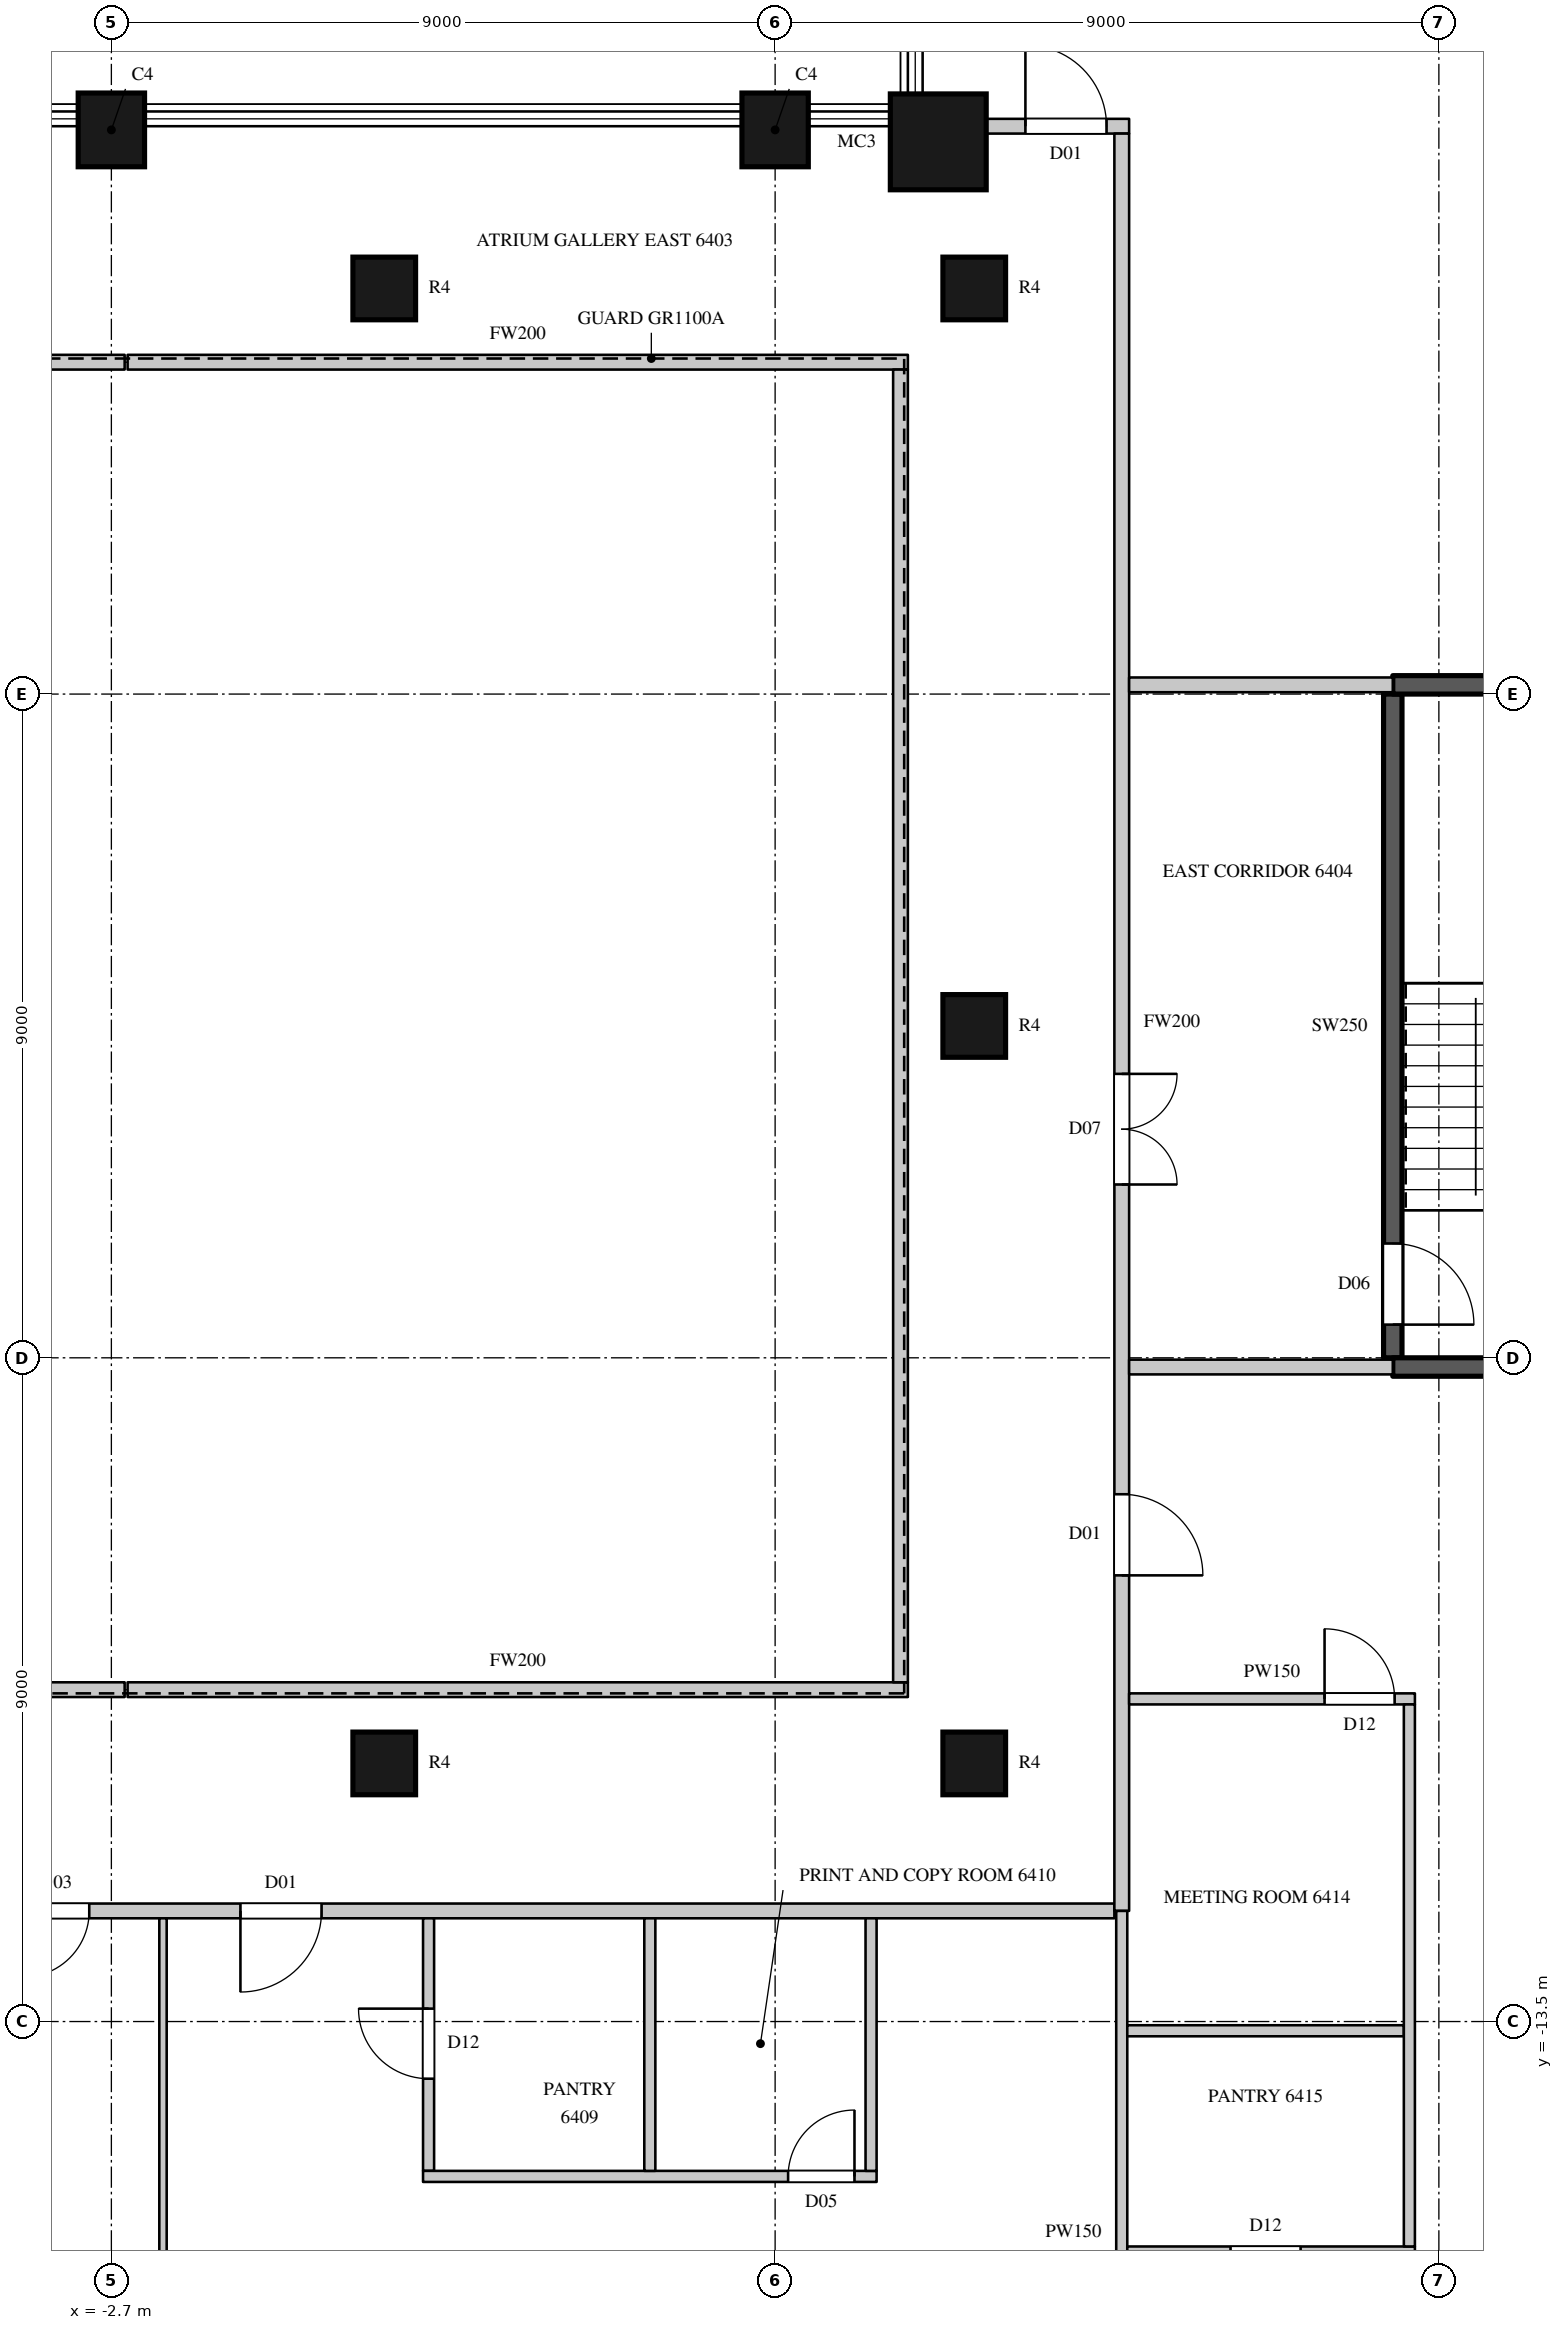
"""IFC4 building model, lengths in metres.
Left out: names, types, materials, properties, quantities, classifications, styles, units other than length and angle.
Written with IfcOpenShell. Run it as: python <this file> out.ifc"""

import sys

from ifc_helpers import new_model, si_unit, direction, frame, frame_2d, origin, origin_2d, place, context, subcontext, project, spatial, rectangle, circle, extrude, element, fill, save


model = new_model("IFC4")
c1 = context("Model", 3, precision=1e-05, world=origin(), true_north=direction((0.0, 1.0)))
c2 = subcontext(c1, "Body", "Model", "MODEL_VIEW")
j1 = project(units=[si_unit("LENGTHUNIT", "METRE"), si_unit("PLANEANGLEUNIT", "RADIAN")], contexts=[c1])
p1 = place(None, origin())
s1 = spatial("IfcSite", under=j1, at=p1, CompositionType="ELEMENT")
p2 = place(p1, origin())
s2 = spatial("IfcBuilding", under=s1, at=p2, CompositionType="ELEMENT")
p3 = place(p2, frame((0.0, 0.0, 284.4)))
s3 = spatial("IfcBuildingStorey", under=s2, at=p3, CompositionType="ELEMENT", Elevation=284.4)
p4 = place(p3, frame((8.512, 11.988, 0.0), z_axis=(0.0, 0.0, 1.0), x_axis=(1.0, 0.0, 0.0)))
e1 = element("IfcColumn", 1, at=p4, inside=s3, PredefinedType="COLUMN", context=c2, shape_type="SweptSolid", body=[
    extrude(circle(Radius=0.65, at=origin_2d()), origin(), (0.0, 0.0, 1.0), 4.1),
])
for number, where, z_axis, x_axis in (
    (2, (6.3, 12.15, 0.0), (0.0, 0.0, 1.0), (-1.0, 0.0, 0.0)),
    (3, (-2.7, 12.15, 0.0), (0.0, 0.0, 1.0), (-1.0, 0.0, 0.0)),
):
    element("IfcColumn", number, at=place(p3, frame(where, z_axis=z_axis, x_axis=x_axis)), inside=s3, PredefinedType="COLUMN", context=c2, shape_type="SweptSolid", body=[
        extrude(rectangle(XDim=0.9, YDim=1.0, at=origin_2d()), origin(), (0.0, 0.0, 1.0), 4.1),
    ])
for number, where, z_axis, x_axis in (
    (4, (1.0, -10.0, 0.0), (0.0, 0.0, 1.0), (1.0, 0.0, 0.0)),
    (5, (1.0, 10.0, 0.0), (0.0, 0.0, 1.0), (1.0, 0.0, 0.0)),
    (6, (9.0, -10.0, 0.0), (0.0, 0.0, 1.0), (1.0, 0.0, 0.0)),
    (7, (9.0, 0.0, 0.0), (0.0, 0.0, 1.0), (1.0, 0.0, 0.0)),
    (8, (9.0, 10.0, 0.0), (0.0, 0.0, 1.0), (1.0, 0.0, 0.0)),
):
    element("IfcColumn", number, at=place(p3, frame(where, z_axis=z_axis, x_axis=x_axis)), inside=s3, PredefinedType="COLUMN", context=c2, shape_type="SweptSolid", body=[
        extrude(circle(Radius=0.425, at=origin_2d()), origin(), (0.0, 0.0, 1.0), 4.1),
    ])
p5 = place(p3, frame((-10.9, -12.0, 0.0), z_axis=(0.0, 0.0, 1.0), x_axis=(1.0, 0.0, 0.0)))
e9 = element("IfcWall", 9, at=p5, inside=s3, PredefinedType="PARTITIONING", context=c2, shape_type="SweptSolid", body=[
    extrude(rectangle(XDim=21.8, YDim=0.2, at=frame_2d((10.9, 0.0))), origin(), (0.0, 0.0, 1.0), 3.8),
])
p6 = place(p5, frame((1.1, 0.0, 0.0)))
e10 = element("IfcOpeningElement", 10, at=p6, cuts=e9, PredefinedType="OPENING", context=c2, shape_type="SweptSolid", body=[
    extrude(rectangle(XDim=0.9, YDim=2.2, at=frame_2d((0.45, 1.1))), frame((0.0, 0.11, 0.0), z_axis=(0.0, -1.0, 0.0), x_axis=(1.0, 0.0, 0.0)), (0.0, 0.0, 1.0), 0.22),
])
p7 = place(p5, frame((4.9, 0.0, 0.0)))
e11 = element("IfcOpeningElement", 11, at=p7, cuts=e9, PredefinedType="OPENING", context=c2, shape_type="SweptSolid", body=[
    extrude(rectangle(XDim=0.9, YDim=2.2, at=frame_2d((0.45, 1.1))), frame((0.0, 0.11, 0.0), z_axis=(0.0, -1.0, 0.0), x_axis=(1.0, 0.0, 0.0)), (0.0, 0.0, 1.0), 0.22),
])
p8 = place(p5, frame((7.0, 0.0, 0.0)))
e12 = element("IfcOpeningElement", 12, at=p8, cuts=e9, PredefinedType="OPENING", context=c2, shape_type="SweptSolid", body=[
    extrude(rectangle(XDim=0.9, YDim=2.2, at=frame_2d((0.45, 1.1))), frame((0.0, 0.11, 0.0), z_axis=(0.0, -1.0, 0.0), x_axis=(1.0, 0.0, 0.0)), (0.0, 0.0, 1.0), 0.22),
])
p9 = place(p5, frame((9.95, 0.0, 0.0)))
e13 = element("IfcOpeningElement", 13, at=p9, cuts=e9, PredefinedType="OPENING", context=c2, shape_type="SweptSolid", body=[
    extrude(rectangle(XDim=1.1, YDim=2.4, at=frame_2d((0.55, 1.2))), frame((0.0, 0.11, 0.0), z_axis=(0.0, -1.0, 0.0), x_axis=(1.0, 0.0, 0.0)), (0.0, 0.0, 1.0), 0.22),
])
for number, where, z_axis, x_axis in (
    (14, (-6.1, -9.0, 0.0), (0.0, 0.0, 1.0), (1.0, 0.0, 0.0)),
    (15, (-6.1, 9.0, 0.0), (0.0, 0.0, 1.0), (1.0, 0.0, 0.0)),
):
    element("IfcWall", number, at=place(p3, frame(where, z_axis=z_axis, x_axis=x_axis)), inside=s3, PredefinedType="PARTITIONING", context=c2, shape_type="SweptSolid", body=[
        extrude(rectangle(XDim=3.58, YDim=0.2, at=frame_2d((1.79, 0.0))), origin(), (0.0, 0.0, 1.0), 3.8),
    ])
for number, where, z_axis, x_axis in (
    (16, (-2.48, -9.0, 0.0), (0.0, 0.0, 1.0), (1.0, 0.0, 0.0)),
    (17, (-2.48, 9.0, 0.0), (0.0, 0.0, 1.0), (1.0, 0.0, 0.0)),
):
    element("IfcWall", number, at=place(p3, frame(where, z_axis=z_axis, x_axis=x_axis)), inside=s3, PredefinedType="PARTITIONING", context=c2, shape_type="SweptSolid", body=[
        extrude(rectangle(XDim=10.58, YDim=0.2, at=frame_2d((5.29, 0.0))), origin(), (0.0, 0.0, 1.0), 3.8),
    ])
p10 = place(p3, frame((8.0, -8.9, 0.0), z_axis=(0.0, 0.0, 1.0), x_axis=(0.0, 1.0, 0.0)))
e18 = element("IfcWall", 18, at=p10, inside=s3, PredefinedType="PARTITIONING", context=c2, shape_type="SweptSolid", body=[
    extrude(rectangle(XDim=17.8, YDim=0.2, at=frame_2d((8.9, 0.0))), origin(), (0.0, 0.0, 1.0), 3.8),
])
p11 = place(p3, frame((9.144, 12.2, 0.0), z_axis=(0.0, 0.0, 1.0), x_axis=(1.0, 0.0, 0.0)))
e19 = element("IfcWall", 19, at=p11, inside=s3, PredefinedType="PARTITIONING", context=c2, shape_type="SweptSolid", body=[
    extrude(rectangle(XDim=1.956, YDim=0.2, at=frame_2d((0.978, 0.0))), origin(), (0.0, 0.0, 1.0), 3.8),
])
p12 = place(p11, frame((0.55, 0.0, 0.0)))
e20 = element("IfcOpeningElement", 20, at=p12, cuts=e19, PredefinedType="OPENING", context=c2, shape_type="SweptSolid", body=[
    extrude(rectangle(XDim=1.1, YDim=2.4, at=frame_2d((0.55, 1.2))), frame((0.0, 0.11, 0.0), z_axis=(0.0, -1.0, 0.0), x_axis=(1.0, 0.0, 0.0)), (0.0, 0.0, 1.0), 0.22),
])
p13 = place(p3, frame((11.0, -12.0, 0.0), z_axis=(0.0, 0.0, 1.0), x_axis=(0.0, 1.0, 0.0)))
e21 = element("IfcWall", 21, at=p13, inside=s3, PredefinedType="PARTITIONING", context=c2, shape_type="SweptSolid", body=[
    extrude(rectangle(XDim=24.1, YDim=0.2, at=frame_2d((12.05, 0.0))), origin(), (0.0, 0.0, 1.0), 3.8),
])
p14 = place(p13, frame((9.85, 0.0, 0.0)))
e22 = element("IfcOpeningElement", 22, at=p14, cuts=e21, PredefinedType="OPENING", context=c2, shape_type="SweptSolid", body=[
    extrude(rectangle(XDim=1.5, YDim=2.4, at=frame_2d((0.75, 1.2))), frame((0.0, 0.11, 0.0), z_axis=(0.0, -1.0, 0.0), x_axis=(1.0, 0.0, 0.0)), (0.0, 0.0, 1.0), 0.22),
])
p15 = place(p13, frame((4.55, 0.0, 0.0)))
e23 = element("IfcOpeningElement", 23, at=p15, cuts=e21, PredefinedType="OPENING", context=c2, shape_type="SweptSolid", body=[
    extrude(rectangle(XDim=1.1, YDim=2.4, at=frame_2d((0.55, 1.2))), frame((0.0, 0.11, 0.0), z_axis=(0.0, -1.0, 0.0), x_axis=(1.0, 0.0, 0.0)), (0.0, 0.0, 1.0), 0.22),
])
for number, where, z_axis, x_axis in (
    (24, (11.1, -4.625, 0.0), (0.0, 0.0, 1.0), (1.0, 0.0, 0.0)),
    (25, (11.1, 4.625, 0.0), (0.0, 0.0, 1.0), (1.0, 0.0, 0.0)),
):
    element("IfcWall", number, at=place(p3, frame(where, z_axis=z_axis, x_axis=x_axis)), inside=s3, PredefinedType="PARTITIONING", context=c2, shape_type="SweptSolid", body=[
        extrude(rectangle(XDim=3.575, YDim=0.2, at=frame_2d((1.788, 0.0))), origin(), (0.0, 0.0, 1.0), 3.8),
    ])
p16 = place(p3, frame((1.601, -15.525, 0.0), z_axis=(0.0, 0.0, 1.0), x_axis=(0.0, 1.0, 0.0)))
e26 = element("IfcWall", 26, at=p16, inside=s3, PredefinedType="PARTITIONING", context=c2, shape_type="SweptSolid", body=[
    extrude(rectangle(XDim=3.425, YDim=0.15, at=frame_2d((1.712, 0.0))), origin(), (0.0, 0.0, 1.0), 3.8),
])
p17 = place(p16, frame((1.25, 0.0, 0.0)))
e27 = element("IfcOpeningElement", 27, at=p17, cuts=e26, PredefinedType="OPENING", context=c2, shape_type="SweptSolid", body=[
    extrude(rectangle(XDim=0.95, YDim=2.2, at=frame_2d((0.475, 1.1))), frame((0.0, 0.085, 0.0), z_axis=(0.0, -1.0, 0.0), x_axis=(1.0, 0.0, 0.0)), (0.0, 0.0, 1.0), 0.17),
])
p18 = place(p3, frame((1.526, -15.6, 0.0), z_axis=(0.0, 0.0, 1.0), x_axis=(1.0, 0.0, 0.0)))
e28 = element("IfcWall", 28, at=p18, inside=s3, PredefinedType="PARTITIONING", context=c2, shape_type="SweptSolid", body=[
    extrude(rectangle(XDim=6.15, YDim=0.15, at=frame_2d((3.075, 0.0))), origin(), (0.0, 0.0, 1.0), 3.8),
])
p19 = place(p18, frame((4.95, 0.0, 0.0)))
e29 = element("IfcOpeningElement", 29, at=p19, cuts=e28, PredefinedType="OPENING", context=c2, shape_type="SweptSolid", body=[
    extrude(rectangle(XDim=0.9, YDim=2.2, at=frame_2d((0.45, 1.1))), frame((0.0, 0.085, 0.0), z_axis=(0.0, -1.0, 0.0), x_axis=(1.0, 0.0, 0.0)), (0.0, 0.0, 1.0), 0.17),
])
for number, where, z_axis, x_axis in (
    (30, (4.601, -15.525, 0.0), (0.0, 0.0, 1.0), (0.0, 1.0, 0.0)),
    (31, (7.601, -15.525, 0.0), (0.0, 0.0, 1.0), (0.0, 1.0, 0.0)),
):
    element("IfcWall", number, at=place(p3, frame(where, z_axis=z_axis, x_axis=x_axis)), inside=s3, PredefinedType="PARTITIONING", context=c2, shape_type="SweptSolid", body=[
        extrude(rectangle(XDim=3.425, YDim=0.15, at=frame_2d((1.712, 0.0))), origin(), (0.0, 0.0, 1.0), 3.8),
    ])
p20 = place(p3, frame((11.0, -20.721, 0.0), z_axis=(0.0, 0.0, 1.0), x_axis=(0.0, 1.0, 0.0)))
e32 = element("IfcWall", 32, at=p20, inside=s3, PredefinedType="PARTITIONING", context=c2, shape_type="SweptSolid", body=[
    extrude(rectangle(XDim=8.721, YDim=0.15, at=frame_2d((4.361, 0.0))), origin(), (0.0, 0.0, 1.0), 3.8),
])
p21 = place(p3, frame((11.075, -16.625, 0.0), z_axis=(0.0, 0.0, 1.0), x_axis=(1.0, 0.0, 0.0)))
e33 = element("IfcWall", 33, at=p21, inside=s3, PredefinedType="PARTITIONING", context=c2, shape_type="SweptSolid", body=[
    extrude(rectangle(XDim=3.9, YDim=0.15, at=frame_2d((1.95, 0.0))), origin(), (0.0, 0.0, 1.0), 3.8),
])
p22 = place(p21, frame((1.4, 0.0, 0.0)))
e34 = element("IfcOpeningElement", 34, at=p22, cuts=e33, PredefinedType="OPENING", context=c2, shape_type="SweptSolid", body=[
    extrude(rectangle(XDim=0.95, YDim=2.2, at=frame_2d((0.475, 1.1))), frame((0.0, 0.085, 0.0), z_axis=(0.0, -1.0, 0.0), x_axis=(1.0, 0.0, 0.0)), (0.0, 0.0, 1.0), 0.17),
])
p23 = place(p3, frame((11.075, -13.625, 0.0), z_axis=(0.0, 0.0, 1.0), x_axis=(1.0, 0.0, 0.0)))
e35 = element("IfcWall", 35, at=p23, inside=s3, PredefinedType="PARTITIONING", context=c2, shape_type="SweptSolid", body=[
    extrude(rectangle(XDim=3.75, YDim=0.15, at=frame_2d((1.875, 0.0))), origin(), (0.0, 0.0, 1.0), 3.8),
])
p24 = place(p3, frame((11.1, -9.125, 0.0), z_axis=(0.0, 0.0, 1.0), x_axis=(1.0, 0.0, 0.0)))
e36 = element("IfcWall", 36, at=p24, inside=s3, PredefinedType="PARTITIONING", context=c2, shape_type="SweptSolid", body=[
    extrude(rectangle(XDim=3.875, YDim=0.15, at=frame_2d((1.938, 0.0))), origin(), (0.0, 0.0, 1.0), 3.8),
])
p25 = place(p24, frame((2.65, 0.0, 0.0)))
e37 = element("IfcOpeningElement", 37, at=p25, cuts=e36, PredefinedType="OPENING", context=c2, shape_type="SweptSolid", body=[
    extrude(rectangle(XDim=0.95, YDim=2.2, at=frame_2d((0.475, 1.1))), frame((0.0, 0.085, 0.0), z_axis=(0.0, -1.0, 0.0), x_axis=(1.0, 0.0, 0.0)), (0.0, 0.0, 1.0), 0.17),
])
p26 = place(p3, frame((14.9, -16.55, 0.0), z_axis=(0.0, 0.0, 1.0), x_axis=(0.0, 1.0, 0.0)))
e38 = element("IfcWall", 38, at=p26, inside=s3, PredefinedType="PARTITIONING", context=c2, shape_type="SweptSolid", body=[
    extrude(rectangle(XDim=7.35, YDim=0.15, at=frame_2d((3.675, 0.0))), origin(), (0.0, 0.0, 1.0), 3.8),
])
p27 = place(p3, frame((14.675, -4.5, 0.0), z_axis=(0.0, 0.0, 1.0), x_axis=(0.0, 1.0, 0.0)))
e39 = element("IfcWall", 39, at=p27, inside=s3, PredefinedType="SHEAR", context=c2, shape_type="SweptSolid", body=[
    extrude(rectangle(XDim=9.0, YDim=0.25, at=frame_2d((4.5, 0.0))), origin(), (0.0, 0.0, 1.0), 3.8),
])
p28 = place(p27, frame((0.45, 0.0, 0.0)))
e40 = element("IfcOpeningElement", 40, at=p28, cuts=e39, PredefinedType="OPENING", context=c2, shape_type="SweptSolid", body=[
    extrude(rectangle(XDim=1.1, YDim=2.2, at=frame_2d((0.55, 1.1))), frame((0.0, 0.135, 0.0), z_axis=(0.0, -1.0, 0.0), x_axis=(1.0, 0.0, 0.0)), (0.0, 0.0, 1.0), 0.27),
])
for number, where, z_axis, x_axis in (
    (41, (14.675, -4.625, 0.0), (0.0, 0.0, 1.0), (1.0, 0.0, 0.0)),
    (42, (14.675, 4.625, 0.0), (0.0, 0.0, 1.0), (1.0, 0.0, 0.0)),
):
    element("IfcWall", number, at=place(p3, frame(where, z_axis=z_axis, x_axis=x_axis)), inside=s3, PredefinedType="SHEAR", context=c2, shape_type="SweptSolid", body=[
        extrude(rectangle(XDim=4.45, YDim=0.25, at=frame_2d((2.225, 0.0))), origin(), (0.0, 0.0, 1.0), 3.8),
    ])
p29 = place(p3, frame((-2.0, -23.447, 0.0), z_axis=(0.0, 0.0, 1.0), x_axis=(0.0, 1.0, 0.0)))
e43 = element("IfcWall", 43, at=p29, inside=s3, PredefinedType="PARTITIONING", context=c2, shape_type="SweptSolid", body=[
    extrude(rectangle(XDim=11.347, YDim=0.1, at=frame_2d((5.674, 0.0))), origin(), (0.0, 0.0, 1.0), 3.8),
])
p30 = place(p14, origin())
e44 = element("IfcDoor", 44, at=p30, inside=s3, OperationType="DOUBLE_DOOR_SINGLE_SWING", PredefinedType="DOOR", context=c2, shape_type="SweptSolid", body=[
    extrude(rectangle(XDim=1.5, YDim=2.4, at=frame_2d((0.75, 1.2))), frame((0.0, 0.025, 0.0), z_axis=(0.0, -1.0, 0.0), x_axis=(1.0, 0.0, 0.0)), (0.0, 0.0, 1.0), 0.05),
])
fill(e22, e44)
p31 = place(p8, origin())
e45 = element("IfcDoor", 45, at=p31, inside=s3, OperationType="SINGLE_SWING_RIGHT", PredefinedType="DOOR", context=c2, shape_type="SweptSolid", body=[
    extrude(rectangle(XDim=0.9, YDim=2.2, at=frame_2d((0.45, 1.1))), frame((0.0, 0.025, 0.0), z_axis=(0.0, -1.0, 0.0), x_axis=(1.0, 0.0, 0.0)), (0.0, 0.0, 1.0), 0.05),
])
fill(e12, e45)
p32 = place(p9, origin())
e46 = element("IfcDoor", 46, at=p32, inside=s3, OperationType="SINGLE_SWING_RIGHT", PredefinedType="DOOR", context=c2, shape_type="SweptSolid", body=[
    extrude(rectangle(XDim=1.1, YDim=2.4, at=frame_2d((0.55, 1.2))), frame((0.0, 0.025, 0.0), z_axis=(0.0, -1.0, 0.0), x_axis=(1.0, 0.0, 0.0)), (0.0, 0.0, 1.0), 0.05),
])
fill(e13, e46)
p33 = place(p17, origin())
e47 = element("IfcDoor", 47, at=p33, inside=s3, OperationType="SINGLE_SWING_RIGHT", PredefinedType="DOOR", context=c2, shape_type="SweptSolid", body=[
    extrude(rectangle(XDim=0.95, YDim=2.2, at=frame_2d((0.475, 1.1))), frame((0.0, 0.025, 0.0), z_axis=(0.0, -1.0, 0.0), x_axis=(1.0, 0.0, 0.0)), (0.0, 0.0, 1.0), 0.05),
])
fill(e27, e47)
p34 = place(p19, origin())
e48 = element("IfcDoor", 48, at=p34, inside=s3, OperationType="SINGLE_SWING_RIGHT", PredefinedType="DOOR", context=c2, shape_type="SweptSolid", body=[
    extrude(rectangle(XDim=0.9, YDim=2.2, at=frame_2d((0.45, 1.1))), frame((0.0, 0.025, 0.0), z_axis=(0.0, -1.0, 0.0), x_axis=(1.0, 0.0, 0.0)), (0.0, 0.0, 1.0), 0.05),
])
fill(e29, e48)
p35 = place(p12, origin())
e49 = element("IfcDoor", 49, at=p35, inside=s3, OperationType="SINGLE_SWING_LEFT", PredefinedType="DOOR", context=c2, shape_type="SweptSolid", body=[
    extrude(rectangle(XDim=1.1, YDim=2.4, at=frame_2d((0.55, 1.2))), frame((0.0, 0.025, 0.0), z_axis=(0.0, -1.0, 0.0), x_axis=(1.0, 0.0, 0.0)), (0.0, 0.0, 1.0), 0.05),
])
fill(e20, e49)
p36 = place(p15, origin())
e50 = element("IfcDoor", 50, at=p36, inside=s3, OperationType="SINGLE_SWING_RIGHT", PredefinedType="DOOR", context=c2, shape_type="SweptSolid", body=[
    extrude(rectangle(XDim=1.1, YDim=2.4, at=frame_2d((0.55, 1.2))), frame((0.0, 0.025, 0.0), z_axis=(0.0, -1.0, 0.0), x_axis=(1.0, 0.0, 0.0)), (0.0, 0.0, 1.0), 0.05),
])
fill(e23, e50)
p37 = place(p25, origin())
e51 = element("IfcDoor", 51, at=p37, inside=s3, OperationType="SINGLE_SWING_LEFT", PredefinedType="DOOR", context=c2, shape_type="SweptSolid", body=[
    extrude(rectangle(XDim=0.95, YDim=2.2, at=frame_2d((0.475, 1.1))), frame((0.0, 0.025, 0.0), z_axis=(0.0, -1.0, 0.0), x_axis=(1.0, 0.0, 0.0)), (0.0, 0.0, 1.0), 0.05),
])
fill(e37, e51)
p38 = place(p28, origin())
e52 = element("IfcDoor", 52, at=p38, inside=s3, OperationType="SINGLE_SWING_RIGHT", PredefinedType="DOOR", context=c2, shape_type="SweptSolid", body=[
    extrude(rectangle(XDim=1.1, YDim=2.2, at=frame_2d((0.55, 1.1))), frame((0.0, 0.025, 0.0), z_axis=(0.0, -1.0, 0.0), x_axis=(1.0, 0.0, 0.0)), (0.0, 0.0, 1.0), 0.05),
])
fill(e40, e52)
save(model, sys.argv[1])
